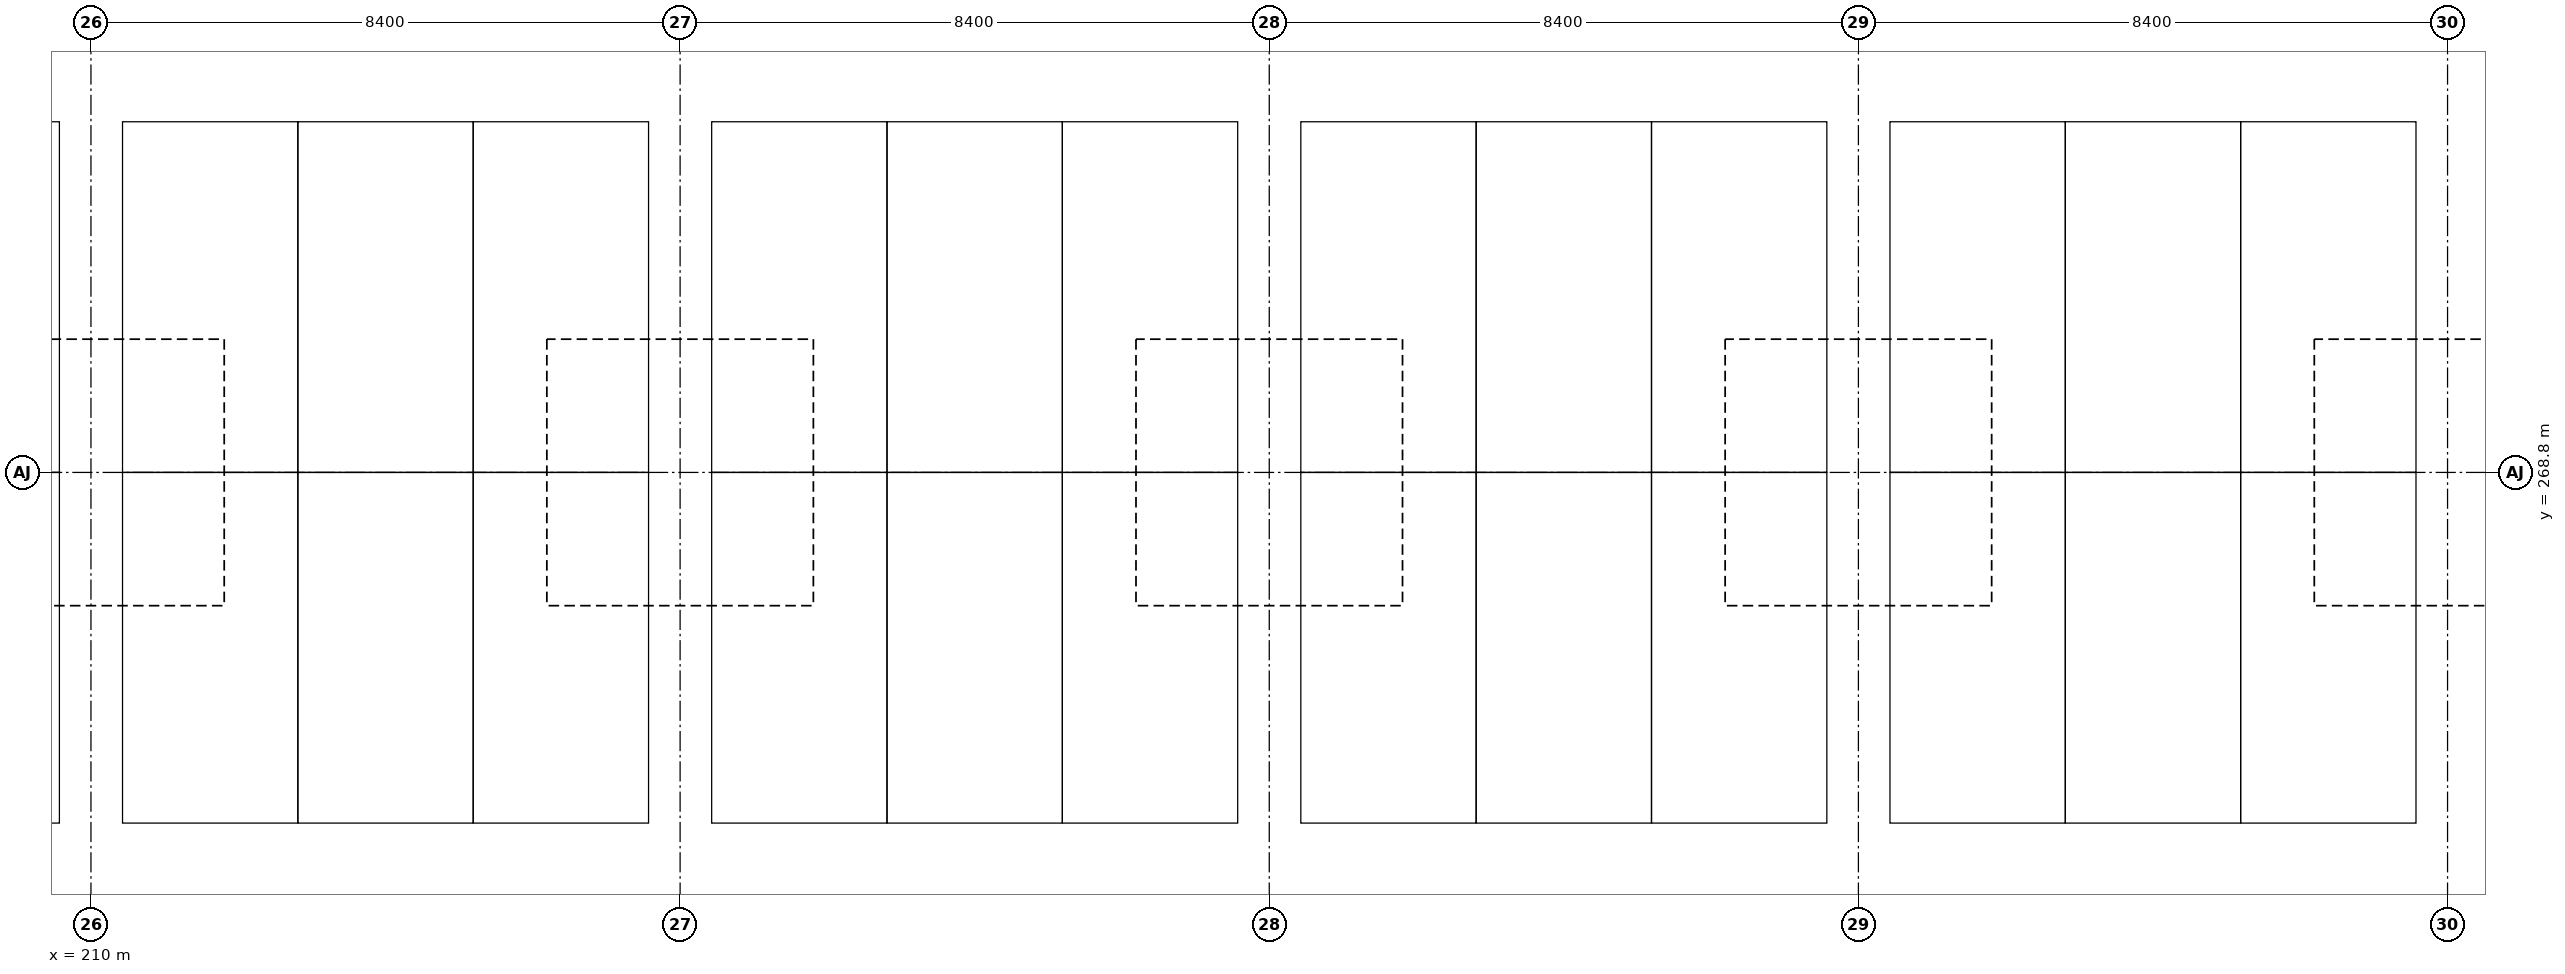
"""IFC4 building model, lengths in metres.
Left out: names, types, materials, properties, quantities, classifications, styles, units other than length and angle.
Written with IfcOpenShell. Run it as: python <this file> out.ifc"""

import sys

from ifc_helpers import new_model, si_unit, direction, frame, origin, origin_2d, place, context, subcontext, project, spatial, rectangle, extrude, element, save


model = new_model("IFC4")
c1 = context("Model", 3, precision=1e-05, world=origin(), true_north=direction((0.0, 1.0)))
c2 = subcontext(c1, "Body", "Model", "MODEL_VIEW")
j1 = project(units=[si_unit("LENGTHUNIT", "METRE"), si_unit("PLANEANGLEUNIT", "RADIAN")], contexts=[c1])
p1 = place(None, origin())
s1 = spatial("IfcSite", under=j1, at=p1, CompositionType="ELEMENT")
p2 = place(p1, origin())
s2 = spatial("IfcBuilding", under=s1, at=p2, CompositionType="ELEMENT")
p3 = place(p2, frame((0.0, 0.0, -3.0)))
s3 = spatial("IfcBuildingStorey", under=s2, at=p3, CompositionType="ELEMENT", Elevation=-3.0)
for number, where, z_axis, x_axis in (
    (1, (210.0, 268.8, 0.0), (0.0, 0.0, 1.0), (1.0, 0.0, 0.0)),
    (2, (218.4, 268.8, 0.0), (0.0, 0.0, 1.0), (1.0, 0.0, 0.0)),
    (3, (226.8, 268.8, 0.0), (0.0, 0.0, 1.0), (1.0, 0.0, 0.0)),
    (4, (235.2, 268.8, 0.0), (0.0, 0.0, 1.0), (1.0, 0.0, 0.0)),
    (5, (243.6, 268.8, 0.0), (0.0, 0.0, 1.0), (1.0, 0.0, 0.0)),
):
    element("IfcColumn", number, at=place(p3, frame(where, z_axis=z_axis, x_axis=x_axis)), inside=s3, PredefinedType="COLUMN", context=c2, shape_type="SweptSolid", body=[
        extrude(rectangle(XDim=0.8, YDim=0.8, at=origin_2d()), origin(), (0.0, 0.0, 1.0), 2.4),
    ])
save(model, sys.argv[1])
